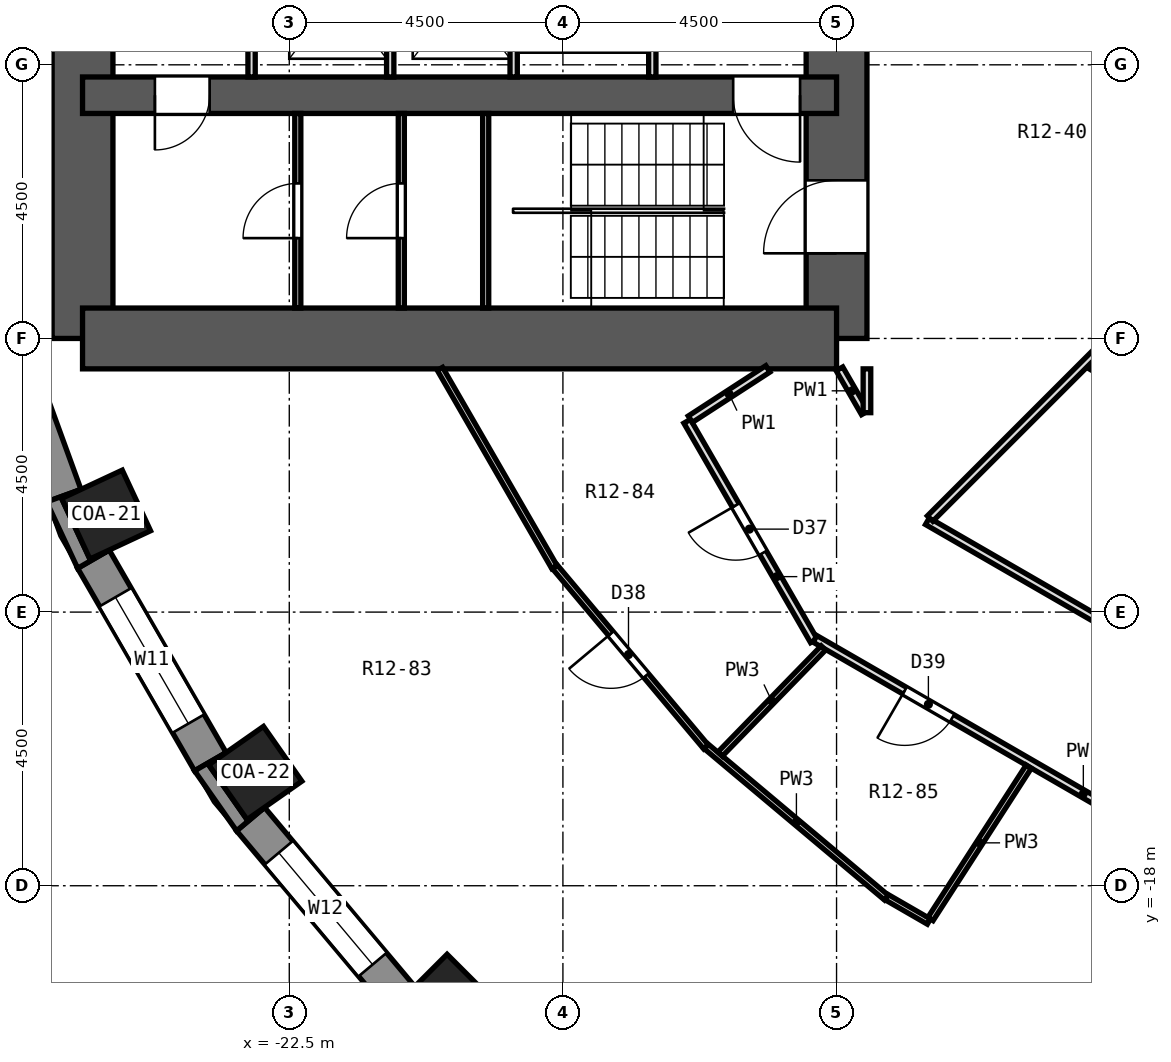
"""IFC4 building model, lengths in metres.
Left out: names, types, materials, properties, quantities, classifications, styles, units other than length and angle.
Written with IfcOpenShell. Run it as: python <this file> out.ifc"""

import sys

from ifc_helpers import new_model, si_unit, direction, frame, frame_2d, origin, origin_2d, place, context, subcontext, project, spatial, polyline, rectangle, outline, extrude, element, fill, save


model = new_model("IFC4")
c1 = context("Model", 3, precision=1e-05, world=origin(), true_north=direction((0.0, 1.0)))
c2 = subcontext(c1, "Body", "Model", "MODEL_VIEW")
j1 = project(units=[si_unit("LENGTHUNIT", "METRE"), si_unit("PLANEANGLEUNIT", "RADIAN")], contexts=[c1])
p1 = place(None, origin())
s1 = spatial("IfcSite", under=j1, at=p1, CompositionType="ELEMENT")
p2 = place(p1, origin())
s2 = spatial("IfcBuilding", under=s1, at=p2, CompositionType="ELEMENT")
p3 = place(p2, frame((0.0, 0.0, 56.0)))
s3 = spatial("IfcBuildingStorey", under=s2, at=p3, CompositionType="ELEMENT", Elevation=56.0)
for number, where, z_axis, x_axis in (
    (1, (-25.512, -11.897, 0.0), (0.0, 0.0, 1.0), (-0.906, -0.423, 0.0)),
    (2, (-23.059, -16.146, 0.0), (0.0, 0.0, 1.0), (-0.819, -0.574, 0.0)),
    (3, (-19.905, -19.905, 0.0), (0.0, 0.0, 1.0), (-0.707, -0.707, 0.0)),
):
    element("IfcColumn", number, at=place(p3, frame(where, z_axis=z_axis, x_axis=x_axis)), inside=s3, PredefinedType="COLUMN", context=c2, shape_type="SweptSolid", body=[
        extrude(rectangle(XDim=1.1, YDim=1.1, at=origin_2d()), origin(), (0.0, 0.0, 1.0), 3.3),
    ])
p4 = place(p3, frame((-13.5, -9.0, 0.0), z_axis=(0.0, 0.0, 1.0), x_axis=(0.0, 1.0, 0.0)))
e4 = element("IfcWall", 4, at=p4, inside=s3, PredefinedType="SHEAR", context=c2, shape_type="SweptSolid", body=[
    extrude(rectangle(XDim=18.0, YDim=1.0, at=frame_2d((9.0, 0.0))), origin(), (0.0, 0.0, 1.0), 3.3),
])
p5 = place(p4, frame((15.4, 0.0, 0.0)))
e5 = element("IfcOpeningElement", 5, at=p5, cuts=e4, PredefinedType="OPENING", context=c2, shape_type="SweptSolid", body=[
    extrude(rectangle(XDim=1.2, YDim=2.1, at=frame_2d((0.6, 1.05))), frame((0.0, 0.512, 0.0), z_axis=(0.0, -1.0, 0.0), x_axis=(1.0, 0.0, 0.0)), (0.0, 0.0, 1.0), 1.024),
])
p6 = place(p4, frame((1.4, 0.0, 0.0)))
e6 = element("IfcOpeningElement", 6, at=p6, cuts=e4, PredefinedType="OPENING", context=c2, shape_type="SweptSolid", body=[
    extrude(rectangle(XDim=1.2, YDim=2.1, at=frame_2d((0.6, 1.05))), frame((0.0, 0.512, 0.0), z_axis=(0.0, -1.0, 0.0), x_axis=(1.0, 0.0, 0.0)), (0.0, 0.0, 1.0), 1.024),
])
p7 = place(p4, frame((7.5, 0.0, 0.0)))
e7 = element("IfcOpeningElement", 7, at=p7, cuts=e4, PredefinedType="OPENING", context=c2, shape_type="SweptSolid", body=[
    extrude(rectangle(XDim=3.0, YDim=2.4, at=frame_2d((1.5, 1.2))), frame((0.0, 0.512, 0.0), z_axis=(0.0, -1.0, 0.0), x_axis=(1.0, 0.0, 0.0)), (0.0, 0.0, 1.0), 1.024),
])
p8 = place(p3, frame((-25.9, -9.0, 0.0), z_axis=(0.0, 0.0, 1.0), x_axis=(0.0, 1.0, 0.0)))
e8 = element("IfcWall", 8, at=p8, inside=s3, PredefinedType="SHEAR", context=c2, shape_type="SweptSolid", body=[
    extrude(rectangle(XDim=18.0, YDim=1.0, at=frame_2d((9.0, 0.0))), origin(), (0.0, 0.0, 1.0), 3.3),
])
p9 = place(p3, frame((-13.5, -9.0, 0.0), z_axis=(0.0, 0.0, 1.0), x_axis=(-1.0, 0.0, 0.0)))
e9 = element("IfcWall", 9, at=p9, inside=s3, PredefinedType="SHEAR", context=c2, shape_type="SweptSolid", body=[
    extrude(rectangle(XDim=12.4, YDim=1.0, at=frame_2d((6.2, 0.0))), origin(), (0.0, 0.0, 1.0), 3.3),
])
p10 = place(p3, frame((-13.5, -5.0, 0.0), z_axis=(0.0, 0.0, 1.0), x_axis=(-1.0, 0.0, 0.0)))
e10 = element("IfcWall", 10, at=p10, inside=s3, PredefinedType="SHEAR", context=c2, shape_type="SweptSolid", body=[
    extrude(rectangle(XDim=12.4, YDim=0.6, at=frame_2d((6.2, 0.0))), origin(), (0.0, 0.0, 1.0), 3.3),
])
p11 = place(p10, frame((10.31, 0.0, 0.0)))
e11 = element("IfcOpeningElement", 11, at=p11, cuts=e10, PredefinedType="OPENING", context=c2, shape_type="SweptSolid", body=[
    extrude(rectangle(XDim=0.9, YDim=2.1, at=frame_2d((0.45, 1.05))), frame((0.0, 0.312, 0.0), z_axis=(0.0, -1.0, 0.0), x_axis=(1.0, 0.0, 0.0)), (0.0, 0.0, 1.0), 0.624),
])
p12 = place(p10, frame((0.6, 0.0, 0.0)))
e12 = element("IfcOpeningElement", 12, at=p12, cuts=e10, PredefinedType="OPENING", context=c2, shape_type="SweptSolid", body=[
    extrude(rectangle(XDim=1.1, YDim=2.1, at=frame_2d((0.55, 1.05))), frame((0.0, 0.312, 0.0), z_axis=(0.0, -1.0, 0.0), x_axis=(1.0, 0.0, 0.0)), (0.0, 0.0, 1.0), 0.624),
])
p13 = place(p3, frame((-27.523, -7.971, 0.0), z_axis=(0.0, 0.0, 1.0), x_axis=(0.342028474173, -0.939689588564, 0.0)))
e13 = element("IfcWall", 13, at=p13, inside=s3, PredefinedType="SOLIDWALL", context=c2, shape_type="SweptSolid", body=[
    extrude(rectangle(XDim=3.846, YDim=0.6, at=frame_2d((1.923, 0.0))), origin(), (0.0, 0.0, 1.0), 2.75),
])
p14 = place(p3, frame((-25.721, -12.63, 0.0), z_axis=(0.0, 0.0, 1.0), x_axis=(0.499989888488, -0.86603124159, 0.0)))
e14 = element("IfcWall", 14, at=p14, inside=s3, PredefinedType="SOLIDWALL", context=c2, shape_type="SweptSolid", body=[
    extrude(rectangle(XDim=3.846, YDim=0.6, at=frame_2d((1.923, 0.0))), origin(), (0.0, 0.0, 1.0), 2.75),
])
p15 = place(p14, frame((0.723, 0.0, 0.9)))
e15 = element("IfcOpeningElement", 15, at=p15, cuts=e14, PredefinedType="OPENING", context=c2, shape_type="SweptSolid", body=[
    extrude(rectangle(XDim=2.4, YDim=1.8, at=frame_2d((1.2, 0.9))), frame((0.0, 0.312, 0.0), z_axis=(0.0, -1.0, 0.0), x_axis=(1.0, 0.0, 0.0)), (0.0, 0.0, 1.0), 0.624),
])
p16 = place(p3, frame((-23.137, -16.904, 0.0), z_axis=(0.0, 0.0, 1.0), x_axis=(0.642809392687, -0.766026164483, 0.0)))
e16 = element("IfcWall", 16, at=p16, inside=s3, PredefinedType="SOLIDWALL", context=c2, shape_type="SweptSolid", body=[
    extrude(rectangle(XDim=3.846, YDim=0.6, at=frame_2d((1.923, 0.0))), origin(), (0.0, 0.0, 1.0), 2.75),
])
p17 = place(p16, frame((0.723, 0.0, 0.9)))
e17 = element("IfcOpeningElement", 17, at=p17, cuts=e16, PredefinedType="OPENING", context=c2, shape_type="SweptSolid", body=[
    extrude(rectangle(XDim=2.4, YDim=1.8, at=frame_2d((1.2, 0.9))), frame((0.0, 0.312, 0.0), z_axis=(0.0, -1.0, 0.0), x_axis=(1.0, 0.0, 0.0)), (0.0, 0.0, 1.0), 0.624),
])
p18 = place(p3, origin())
e18 = element("IfcWall", 18, at=p18, inside=s3, PredefinedType="SOLIDWALL", context=c2, shape_type="SweptSolid", body=[
    extrude(outline(polyline([(-25.981, -12.78), (-25.461, -12.479), (-25.779, -12.628), (-26.243, -11.631), (-25.926, -11.483), (-26.49, -11.688), (-25.981, -12.78)])), origin(), (0.0, 0.0, 1.0), 2.75),
])
p19 = place(p3, origin())
e19 = element("IfcWall", 19, at=p19, inside=s3, PredefinedType="SOLIDWALL", context=c2, shape_type="SweptSolid", body=[
    extrude(outline(polyline([(-24.058, -16.11), (-23.367, -17.097), (-22.907, -16.711), (-23.194, -16.912), (-23.825, -16.011), (-23.538, -15.81), (-24.058, -16.11)])), origin(), (0.0, 0.0, 1.0), 2.75),
])
p20 = place(p3, frame((-20.022, -9.5, 0.0), z_axis=(0.0, 0.0, 1.0), x_axis=(0.500001120693, -0.866024756751, 0.0)))
e20 = element("IfcWall", 20, at=p20, inside=s3, PredefinedType="PARTITIONING", context=c2, shape_type="SweptSolid", body=[
    extrude(rectangle(XDim=3.767, YDim=0.1, at=frame_2d((1.883, 0.0))), origin(), (0.0, 0.0, 1.0), 2.75),
])
p21 = place(p3, frame((-15.957, -10.362, 0.0), z_axis=(0.0, 0.0, 1.0), x_axis=(0.500063859158, -0.865988531543, 0.0)))
e21 = element("IfcWall", 21, at=p21, inside=s3, PredefinedType="PARTITIONING", context=c2, shape_type="SweptSolid", body=[
    extrude(rectangle(XDim=4.168, YDim=0.125, at=frame_2d((2.084, 0.0))), origin(), (0.0, 0.0, 1.0), 2.75),
])
p22 = place(p21, frame((1.598, 0.0, 0.0)))
e22 = element("IfcOpeningElement", 22, at=p22, cuts=e21, PredefinedType="OPENING", context=c2, shape_type="SweptSolid", body=[
    extrude(rectangle(XDim=0.9, YDim=2.1, at=frame_2d((0.45, 1.05))), frame((0.0, 0.074, 0.0), z_axis=(0.0, -1.0, 0.0), x_axis=(1.0, 0.0, 0.0)), (0.0, 0.0, 1.0), 0.149),
])
p23 = place(p3, frame((-13.452, -9.5, 0.0), z_axis=(0.0, 0.0, 1.0), x_axis=(0.49991670217, -0.866073490468, 0.0)))
e23 = element("IfcWall", 23, at=p23, inside=s3, PredefinedType="PARTITIONING", context=c2, shape_type="SweptSolid", body=[
    extrude(rectangle(XDim=0.834, YDim=0.125, at=frame_2d((0.417, 0.0))), origin(), (0.0, 0.0, 1.0), 2.75),
])
p24 = place(p3, frame((-18.132, -12.756, 0.0), z_axis=(0.0, 0.0, 1.0), x_axis=(0.642851400185, -0.765990912009, 0.0)))
e24 = element("IfcWall", 24, at=p24, inside=s3, PredefinedType="PARTITIONING", context=c2, shape_type="SweptSolid", body=[
    extrude(rectangle(XDim=3.866, YDim=0.1, at=frame_2d((1.933, 0.0))), origin(), (0.0, 0.0, 1.0), 2.75),
])
p25 = place(p24, frame((1.433, 0.0, 0.0)))
e25 = element("IfcOpeningElement", 25, at=p25, cuts=e24, PredefinedType="OPENING", context=c2, shape_type="SweptSolid", body=[
    extrude(rectangle(XDim=0.9, YDim=2.1, at=frame_2d((0.45, 1.05))), frame((0.0, 0.062, 0.0), z_axis=(0.0, -1.0, 0.0), x_axis=(1.0, 0.0, 0.0)), (0.0, 0.0, 1.0), 0.124),
])
p26 = place(p3, frame((-15.641, -15.711, 0.0), z_axis=(0.0, 0.0, 1.0), x_axis=(0.765990912009, -0.642851400185, 0.0)))
e26 = element("IfcWall", 26, at=p26, inside=s3, PredefinedType="PARTITIONING", context=c2, shape_type="SweptSolid", body=[
    extrude(rectangle(XDim=3.866, YDim=0.1, at=frame_2d((1.933, 0.0))), origin(), (0.0, 0.0, 1.0), 2.75),
])
p27 = place(p3, frame((-12.675, -18.189, 0.0), z_axis=(0.0, 0.0, 1.0), x_axis=(0.865961984968, -0.500109828528, 0.0)))
e27 = element("IfcWall", 27, at=p27, inside=s3, PredefinedType="PARTITIONING", context=c2, shape_type="SweptSolid", body=[
    extrude(rectangle(XDim=0.8, YDim=0.1, at=frame_2d((0.4, 0.0))), origin(), (0.0, 0.0, 1.0), 2.75),
])
p28 = place(p3, frame((-13.855, -13.94, 0.0), z_axis=(0.0, 0.0, 1.0), x_axis=(0.866024825845, -0.50000100102, 0.0)))
e28 = element("IfcWall", 28, at=p28, inside=s3, PredefinedType="PARTITIONING", context=c2, shape_type="SweptSolid", body=[
    extrude(rectangle(XDim=10.192, YDim=0.125, at=frame_2d((5.096, 0.0))), origin(), (0.0, 0.0, 1.0), 2.75),
])
p29 = place(p28, frame((1.704, 0.0, 0.0)))
e29 = element("IfcOpeningElement", 29, at=p29, cuts=e28, PredefinedType="OPENING", context=c2, shape_type="SweptSolid", body=[
    extrude(rectangle(XDim=0.9, YDim=2.1, at=frame_2d((0.45, 1.05))), frame((0.0, 0.074, 0.0), z_axis=(0.0, -1.0, 0.0), x_axis=(1.0, 0.0, 0.0)), (0.0, 0.0, 1.0), 0.149),
])
p30 = place(p3, frame((-12.006, -12.006, 0.0), z_axis=(0.0, 0.0, 1.0), x_axis=(0.866073188118, -0.499917225971, 0.0)))
e30 = element("IfcWall", 30, at=p30, inside=s3, PredefinedType="PARTITIONING", context=c2, shape_type="SweptSolid", body=[
    extrude(rectangle(XDim=8.861, YDim=0.125, at=frame_2d((4.431, 0.0))), origin(), (0.0, 0.0, 1.0), 2.75),
])
p31 = place(p30, frame((3.945, 0.0, 0.0)))
e31 = element("IfcOpeningElement", 31, at=p31, cuts=e30, PredefinedType="OPENING", context=c2, shape_type="SweptSolid", body=[
    extrude(rectangle(XDim=0.9, YDim=2.1, at=frame_2d((0.45, 1.05))), frame((0.0, 0.074, 0.0), z_axis=(0.0, -1.0, 0.0), x_axis=(1.0, 0.0, 0.0)), (0.0, 0.0, 1.0), 0.149),
])
p32 = place(p3, frame((-9.353, -9.438, 0.0), z_axis=(0.0, 0.0, 1.0), x_axis=(0.866030680601, -0.499990860175, 0.0)))
e32 = element("IfcWall", 32, at=p32, inside=s3, PredefinedType="PARTITIONING", context=c2, shape_type="SweptSolid", body=[
    extrude(rectangle(XDim=6.824, YDim=0.1, at=frame_2d((3.412, 0.0))), origin(), (0.0, 0.0, 1.0), 2.75),
])
p33 = place(p32, frame((2.931, 0.0, 0.0)))
e33 = element("IfcOpeningElement", 33, at=p33, cuts=e32, PredefinedType="OPENING", context=c2, shape_type="SweptSolid", body=[
    extrude(rectangle(XDim=0.9, YDim=2.1, at=frame_2d((0.45, 1.05))), frame((0.0, 0.062, 0.0), z_axis=(0.0, -1.0, 0.0), x_axis=(1.0, 0.0, 0.0)), (0.0, 0.0, 1.0), 0.124),
])
p34 = place(p3, frame((-15.905, -10.328, 0.0), z_axis=(0.0, 0.0, 1.0), x_axis=(0.83882853689, 0.544395706908, 0.0)))
e34 = element("IfcWall", 34, at=p34, inside=s3, PredefinedType="PARTITIONING", context=c2, shape_type="SweptSolid", body=[
    extrude(rectangle(XDim=1.521, YDim=0.125, at=frame_2d((0.76, 0.0))), origin(), (0.0, 0.0, 1.0), 2.75),
])
p35 = place(p3, frame((-11.962, -11.962, 0.0), z_axis=(0.0, 0.0, 1.0), x_axis=(0.707106781187, 0.707106781187, 0.0)))
e35 = element("IfcWall", 35, at=p35, inside=s3, PredefinedType="PARTITIONING", context=c2, shape_type="SweptSolid", body=[
    extrude(rectangle(XDim=7.324, YDim=0.125, at=frame_2d((3.662, 0.0))), origin(), (0.0, 0.0, 1.0), 2.75),
])
p36 = place(p3, frame((-15.415, -15.835, 0.0), z_axis=(0.0, 0.0, 1.0), x_axis=(0.697366094861, 0.716715096631, 0.0)))
e36 = element("IfcWall", 36, at=p36, inside=s3, PredefinedType="PARTITIONING", context=c2, shape_type="SweptSolid", body=[
    extrude(rectangle(XDim=2.435, YDim=0.1, at=frame_2d((1.218, 0.0))), origin(), (0.0, 0.0, 1.0), 2.75),
])
p37 = place(p3, frame((-11.955, -18.547, 0.0), z_axis=(0.0, 0.0, 1.0), x_axis=(0.541837653492, 0.840483168932, 0.0)))
e37 = element("IfcWall", 37, at=p37, inside=s3, PredefinedType="PARTITIONING", context=c2, shape_type="SweptSolid", body=[
    extrude(rectangle(XDim=2.98, YDim=0.1, at=frame_2d((1.49, 0.0))), origin(), (0.0, 0.0, 1.0), 2.75),
])
p38 = place(p3, frame((-11.664, -25.003, 0.0), z_axis=(0.0, 0.0, 1.0), x_axis=(0.423588806437, 0.905854581631, 0.0)))
e38 = element("IfcWall", 38, at=p38, inside=s3, PredefinedType="PARTITIONING", context=c2, shape_type="SweptSolid", body=[
    extrude(rectangle(XDim=8.455, YDim=0.15, at=frame_2d((4.227, 0.0))), origin(), (0.0, 0.0, 1.0), 2.75),
])
p39 = place(p3, frame((-13.0, -10.22, 0.0), z_axis=(0.0, 0.0, 1.0), x_axis=(0.0, 1.0, 0.0)))
e39 = element("IfcWall", 39, at=p39, inside=s3, PredefinedType="PARTITIONING", context=c2, shape_type="SweptSolid", body=[
    extrude(rectangle(XDim=0.72, YDim=0.125, at=frame_2d((0.36, 0.0))), origin(), (0.0, 0.0, 1.0), 2.75),
])
p40 = place(p3, frame((-16.53, -4.7, 0.0), z_axis=(0.0, 0.0, 1.0), x_axis=(0.0, 1.0, 0.0)))
e40 = element("IfcWall", 40, at=p40, inside=s3, PredefinedType="PARTITIONING", context=c2, shape_type="SweptSolid", body=[
    extrude(rectangle(XDim=2.4, YDim=0.12, at=frame_2d((1.2, 0.0))), origin(), (0.0, 0.0, 1.0), 2.75),
])
p41 = place(p40, frame((0.65, 0.0, 0.0)))
e41 = element("IfcOpeningElement", 41, at=p41, cuts=e40, PredefinedType="OPENING", context=c2, shape_type="SweptSolid", body=[
    extrude(rectangle(XDim=1.1, YDim=2.1, at=frame_2d((0.55, 1.05))), frame((0.0, 0.072, 0.0), z_axis=(0.0, -1.0, 0.0), x_axis=(1.0, 0.0, 0.0)), (0.0, 0.0, 1.0), 0.144),
])
for number, where, z_axis, x_axis in (
    (42, (-18.81, -4.7, 0.0), (0.0, 0.0, 1.0), (0.0, 1.0, 0.0)),
    (43, (-20.84, -4.7, 0.0), (0.0, 0.0, 1.0), (0.0, 1.0, 0.0)),
    (44, (-23.12, -4.7, 0.0), (0.0, 0.0, 1.0), (0.0, 1.0, 0.0)),
):
    element("IfcWall", number, at=place(p3, frame(where, z_axis=z_axis, x_axis=x_axis)), inside=s3, PredefinedType="PARTITIONING", context=c2, shape_type="SweptSolid", body=[
        extrude(rectangle(XDim=2.4, YDim=0.12, at=frame_2d((1.2, 0.0))), origin(), (0.0, 0.0, 1.0), 2.75),
    ])
p42 = place(p3, frame((-19.27, -8.5, 0.0), z_axis=(0.0, 0.0, 1.0), x_axis=(0.0, 1.0, 0.0)))
e45 = element("IfcWall", 45, at=p42, inside=s3, PredefinedType="PARTITIONING", context=c2, shape_type="SweptSolid", body=[
    extrude(rectangle(XDim=3.2, YDim=0.1, at=frame_2d((1.6, 0.0))), origin(), (0.0, 0.0, 1.0), 2.75),
])
p43 = place(p3, frame((-20.658, -8.5, 0.0), z_axis=(0.0, 0.0, 1.0), x_axis=(0.0, 1.0, 0.0)))
e46 = element("IfcWall", 46, at=p43, inside=s3, PredefinedType="PARTITIONING", context=c2, shape_type="SweptSolid", body=[
    extrude(rectangle(XDim=3.2, YDim=0.1, at=frame_2d((1.6, 0.0))), origin(), (0.0, 0.0, 1.0), 2.75),
])
p44 = place(p43, frame((1.15, 0.0, 0.0)))
e47 = element("IfcOpeningElement", 47, at=p44, cuts=e46, PredefinedType="OPENING", context=c2, shape_type="SweptSolid", body=[
    extrude(rectangle(XDim=0.9, YDim=2.1, at=frame_2d((0.45, 1.05))), frame((0.0, 0.062, 0.0), z_axis=(0.0, -1.0, 0.0), x_axis=(1.0, 0.0, 0.0)), (0.0, 0.0, 1.0), 0.124),
])
p45 = place(p3, frame((-22.36, -8.5, 0.0), z_axis=(0.0, 0.0, 1.0), x_axis=(0.0, 1.0, 0.0)))
e48 = element("IfcWall", 48, at=p45, inside=s3, PredefinedType="PARTITIONING", context=c2, shape_type="SweptSolid", body=[
    extrude(rectangle(XDim=3.2, YDim=0.1, at=frame_2d((1.6, 0.0))), origin(), (0.0, 0.0, 1.0), 2.75),
])
p46 = place(p45, frame((1.15, 0.0, 0.0)))
e49 = element("IfcOpeningElement", 49, at=p46, cuts=e48, PredefinedType="OPENING", context=c2, shape_type="SweptSolid", body=[
    extrude(rectangle(XDim=0.9, YDim=2.1, at=frame_2d((0.45, 1.05))), frame((0.0, 0.062, 0.0), z_axis=(0.0, -1.0, 0.0), x_axis=(1.0, 0.0, 0.0)), (0.0, 0.0, 1.0), 0.124),
])
p47 = place(p15, origin())
e50 = element("IfcWindow", 50, at=p47, inside=s3, PartitioningType="SINGLE_PANEL", PredefinedType="WINDOW", context=c2, shape_type="SweptSolid", body=[
    extrude(rectangle(XDim=2.4, YDim=1.8, at=frame_2d((1.2, 0.9))), frame((0.0, 0.18, 0.0), z_axis=(0.0, -1.0, 0.0), x_axis=(1.0, 0.0, 0.0)), (0.0, 0.0, 1.0), 0.06),
])
fill(e15, e50)
p48 = place(p17, origin())
e51 = element("IfcWindow", 51, at=p48, inside=s3, PartitioningType="SINGLE_PANEL", PredefinedType="WINDOW", context=c2, shape_type="SweptSolid", body=[
    extrude(rectangle(XDim=2.4, YDim=1.8, at=frame_2d((1.2, 0.9))), frame((0.0, 0.18, 0.0), z_axis=(0.0, -1.0, 0.0), x_axis=(1.0, 0.0, 0.0)), (0.0, 0.0, 1.0), 0.06),
])
fill(e17, e51)
p49 = place(p22, frame((0.9, 0.0, 0.0), z_axis=(0.0, 0.0, 1.0), x_axis=(-1.0, 0.0, 0.0)))
e52 = element("IfcDoor", 52, at=p49, inside=s3, OperationType="SINGLE_SWING_RIGHT", PredefinedType="DOOR", context=c2, shape_type="SweptSolid", body=[
    extrude(rectangle(XDim=0.9, YDim=2.1, at=frame_2d((0.45, 1.05))), frame((0.0, 0.025, 0.0), z_axis=(0.0, -1.0, 0.0), x_axis=(1.0, 0.0, 0.0)), (0.0, 0.0, 1.0), 0.05),
])
fill(e22, e52)
p50 = place(p25, frame((0.9, 0.0, 0.0), z_axis=(0.0, 0.0, 1.0), x_axis=(-1.0, 0.0, 0.0)))
e53 = element("IfcDoor", 53, at=p50, inside=s3, OperationType="SINGLE_SWING_RIGHT", PredefinedType="DOOR", context=c2, shape_type="SweptSolid", body=[
    extrude(rectangle(XDim=0.9, YDim=2.1, at=frame_2d((0.45, 1.05))), frame((0.0, 0.025, 0.0), z_axis=(0.0, -1.0, 0.0), x_axis=(1.0, 0.0, 0.0)), (0.0, 0.0, 1.0), 0.05),
])
fill(e25, e53)
p51 = place(p29, frame((0.9, 0.0, 0.0), z_axis=(0.0, 0.0, 1.0), x_axis=(-1.0, 0.0, 0.0)))
e54 = element("IfcDoor", 54, at=p51, inside=s3, OperationType="SINGLE_SWING_RIGHT", PredefinedType="DOOR", context=c2, shape_type="SweptSolid", body=[
    extrude(rectangle(XDim=0.9, YDim=2.1, at=frame_2d((0.45, 1.05))), frame((0.0, 0.025, 0.0), z_axis=(0.0, -1.0, 0.0), x_axis=(1.0, 0.0, 0.0)), (0.0, 0.0, 1.0), 0.05),
])
fill(e29, e54)
p52 = place(p46, origin())
e55 = element("IfcDoor", 55, at=p52, inside=s3, OperationType="SINGLE_SWING_LEFT", PredefinedType="DOOR", context=c2, shape_type="SweptSolid", body=[
    extrude(rectangle(XDim=0.9, YDim=2.1, at=frame_2d((0.45, 1.05))), frame((0.0, 0.025, 0.0), z_axis=(0.0, -1.0, 0.0), x_axis=(1.0, 0.0, 0.0)), (0.0, 0.0, 1.0), 0.05),
])
fill(e49, e55)
p53 = place(p44, origin())
e56 = element("IfcDoor", 56, at=p53, inside=s3, OperationType="SINGLE_SWING_LEFT", PredefinedType="DOOR", context=c2, shape_type="SweptSolid", body=[
    extrude(rectangle(XDim=0.9, YDim=2.1, at=frame_2d((0.45, 1.05))), frame((0.0, 0.025, 0.0), z_axis=(0.0, -1.0, 0.0), x_axis=(1.0, 0.0, 0.0)), (0.0, 0.0, 1.0), 0.05),
])
fill(e47, e56)
p54 = place(p11, origin())
e57 = element("IfcDoor", 57, at=p54, inside=s3, OperationType="SINGLE_SWING_RIGHT", PredefinedType="DOOR", context=c2, shape_type="SweptSolid", body=[
    extrude(rectangle(XDim=0.9, YDim=2.1, at=frame_2d((0.45, 1.05))), frame((0.0, 0.025, 0.0), z_axis=(0.0, -1.0, 0.0), x_axis=(1.0, 0.0, 0.0)), (0.0, 0.0, 1.0), 0.05),
])
fill(e11, e57)
p55 = place(p12, origin())
e58 = element("IfcDoor", 58, at=p55, inside=s3, OperationType="SINGLE_SWING_LEFT", PredefinedType="DOOR", context=c2, shape_type="SweptSolid", body=[
    extrude(rectangle(XDim=1.1, YDim=2.1, at=frame_2d((0.55, 1.05))), frame((0.0, 0.025, 0.0), z_axis=(0.0, -1.0, 0.0), x_axis=(1.0, 0.0, 0.0)), (0.0, 0.0, 1.0), 0.05),
])
fill(e12, e58)
p56 = place(p6, origin())
e59 = element("IfcDoor", 59, at=p56, inside=s3, OperationType="SINGLE_SWING_LEFT", PredefinedType="DOOR", context=c2, shape_type="SweptSolid", body=[
    extrude(rectangle(XDim=1.2, YDim=2.1, at=frame_2d((0.6, 1.05))), frame((0.0, 0.025, 0.0), z_axis=(0.0, -1.0, 0.0), x_axis=(1.0, 0.0, 0.0)), (0.0, 0.0, 1.0), 0.05),
])
fill(e6, e59)
save(model, sys.argv[1])
